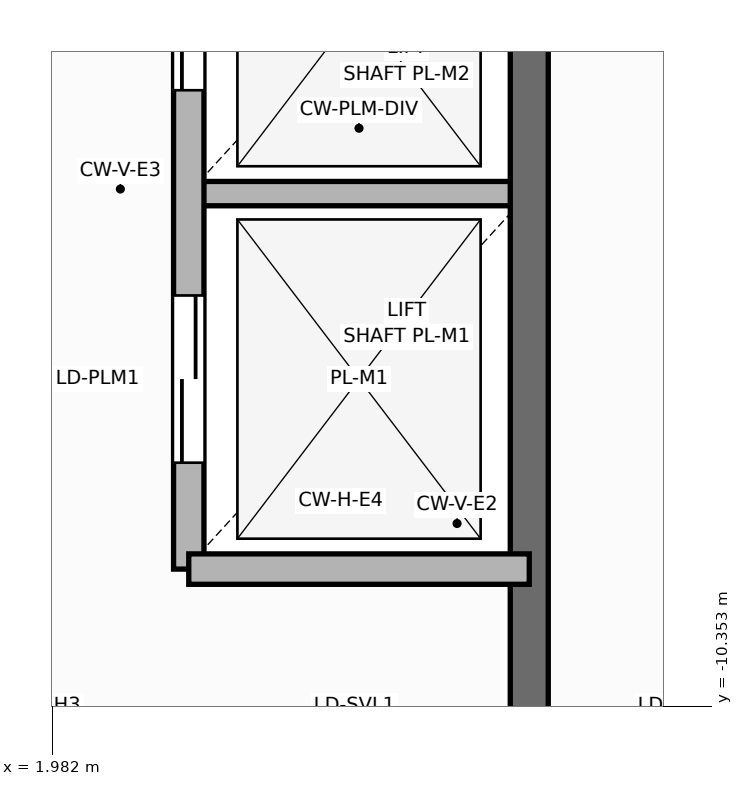
"""IFC4 building model, lengths in metres.
Left out: names, types, materials, properties, quantities, classifications, styles, units other than length and angle.
Written with IfcOpenShell. Run it as: python <this file> out.ifc"""

import sys

from ifc_helpers import new_model, si_unit, direction, frame, frame_2d, origin, place, context, subcontext, project, spatial, rectangle, extrude, element, fill, save


model = new_model("IFC4")
c1 = context("Model", 3, precision=1e-05, world=origin(), true_north=direction((0.0, 1.0)))
c2 = subcontext(c1, "Body", "Model", "MODEL_VIEW")
j1 = project(units=[si_unit("LENGTHUNIT", "METRE"), si_unit("PLANEANGLEUNIT", "RADIAN")], contexts=[c1])
p1 = place(None, origin())
s1 = spatial("IfcSite", under=j1, at=p1, CompositionType="ELEMENT")
p2 = place(p1, origin())
s2 = spatial("IfcBuilding", under=s1, at=p2, CompositionType="ELEMENT")
p3 = place(p2, frame((0.0, 0.0, 114.0)))
s3 = spatial("IfcBuildingStorey", under=s2, at=p3, CompositionType="ELEMENT", Elevation=114.0)
p4 = place(p3, frame((2.88, -6.98, 0.0), z_axis=(0.0, 0.0, 1.0), x_axis=(1.0, 0.0, 0.0)))
e1 = element("IfcWall", 1, at=p4, inside=s3, PredefinedType="PARTITIONING", context=c2, shape_type="SweptSolid", body=[
    extrude(rectangle(XDim=2.24, YDim=0.16, at=frame_2d((1.12, 0.0))), origin(), (0.0, 0.0, 1.0), 3.32),
])
p5 = place(p3, frame((5.12, -13.85, 0.0), z_axis=(0.0, 0.0, 1.0), x_axis=(0.0, 1.0, 0.0)))
e2 = element("IfcWall", 2, at=p5, inside=s3, PredefinedType="SHEAR", context=c2, shape_type="SweptSolid", body=[
    extrude(rectangle(XDim=9.4, YDim=0.25, at=frame_2d((4.7, 0.0))), origin(), (0.0, 0.0, 1.0), 3.6),
])
p6 = place(p3, frame((2.88, -9.45, 0.0), z_axis=(0.0, 0.0, 1.0), x_axis=(0.0, 1.0, 0.0)))
e3 = element("IfcWall", 3, at=p6, inside=s3, PredefinedType="SOLIDWALL", context=c2, shape_type="SweptSolid", body=[
    extrude(rectangle(XDim=5.0, YDim=0.2, at=frame_2d((2.5, 0.0))), origin(), (0.0, 0.0, 1.0), 3.32),
])
p7 = place(p6, frame((0.7, 0.0, 0.0)))
e4 = element("IfcOpeningElement", 4, at=p7, cuts=e3, PredefinedType="OPENING", context=c2, shape_type="SweptSolid", body=[
    extrude(rectangle(XDim=1.106, YDim=2.104, at=frame_2d((0.55, 1.052))), frame((0.0, 0.11, 0.0), z_axis=(0.0, -1.0, 0.0), x_axis=(1.0, 0.0, 0.0)), (0.0, 0.0, 1.0), 0.22),
])
p8 = place(p6, frame((3.15, 0.0, 0.0)))
e5 = element("IfcOpeningElement", 5, at=p8, cuts=e3, PredefinedType="OPENING", context=c2, shape_type="SweptSolid", body=[
    extrude(rectangle(XDim=1.106, YDim=2.104, at=frame_2d((0.55, 1.052))), frame((0.0, 0.11, 0.0), z_axis=(0.0, -1.0, 0.0), x_axis=(1.0, 0.0, 0.0)), (0.0, 0.0, 1.0), 0.22),
])
p9 = place(p3, frame((2.88, -9.45, 0.0), z_axis=(0.0, 0.0, 1.0), x_axis=(1.0, 0.0, 0.0)))
e6 = element("IfcWall", 6, at=p9, inside=s3, PredefinedType="SOLIDWALL", context=c2, shape_type="SweptSolid", body=[
    extrude(rectangle(XDim=2.24, YDim=0.2, at=frame_2d((1.12, 0.0))), origin(), (0.0, 0.0, 1.0), 3.32),
])
p10 = place(p7, origin())
e7 = element("IfcDoor", 7, at=p10, inside=s3, OperationType="DOUBLE_DOOR_SLIDING", PredefinedType="DOOR", context=c2, shape_type="SweptSolid", body=[
    extrude(rectangle(XDim=1.1, YDim=2.1, at=frame_2d((0.55, 1.05))), frame((0.0, 0.025, 0.0), z_axis=(0.0, -1.0, 0.0), x_axis=(1.0, 0.0, 0.0)), (0.0, 0.0, 1.0), 0.05),
])
fill(e4, e7)
p11 = place(p8, origin())
e8 = element("IfcDoor", 8, at=p11, inside=s3, OperationType="DOUBLE_DOOR_SLIDING", PredefinedType="DOOR", context=c2, shape_type="SweptSolid", body=[
    extrude(rectangle(XDim=1.1, YDim=2.1, at=frame_2d((0.55, 1.05))), frame((0.0, 0.025, 0.0), z_axis=(0.0, -1.0, 0.0), x_axis=(1.0, 0.0, 0.0)), (0.0, 0.0, 1.0), 0.05),
])
fill(e5, e8)
save(model, sys.argv[1])
